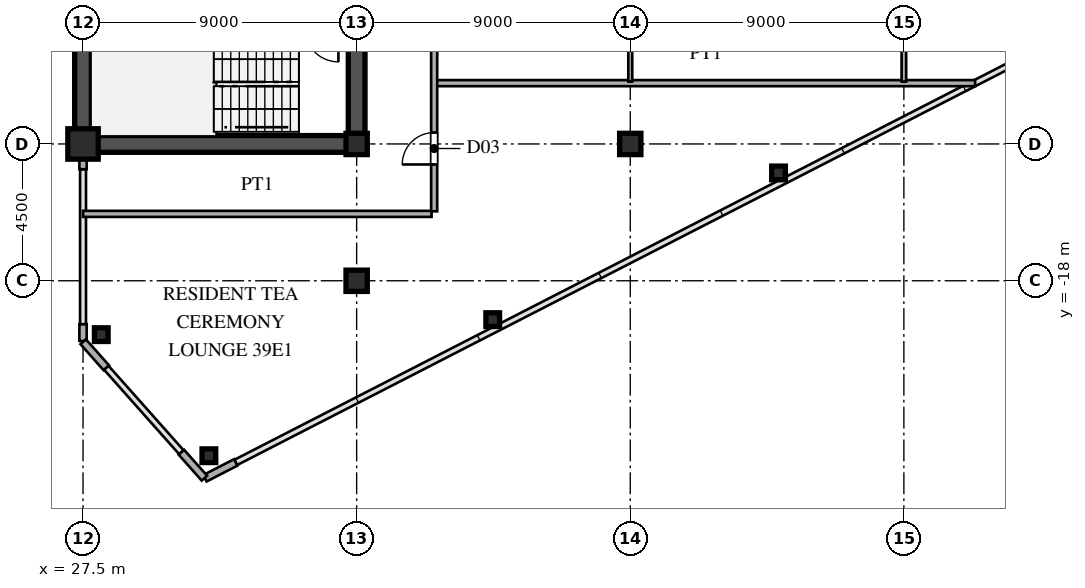
"""IFC4 building model, lengths in metres.
Left out: names, types, materials, properties, quantities, classifications, styles, units other than length and angle.
Written with IfcOpenShell. Run it as: python <this file> out.ifc"""

import sys

from ifc_helpers import new_model, si_unit, direction, frame, frame_2d, origin, origin_2d, place, context, subcontext, project, spatial, rectangle, hollow_rectangle, i_section, extrude, source, transform, mapped, element, fill, save


model = new_model("IFC4")
c1 = context("Model", 3, precision=1e-05, world=origin(), true_north=direction((0.0, 1.0)))
c2 = subcontext(c1, "Body", "Model", "MODEL_VIEW")
j1 = project(units=[si_unit("LENGTHUNIT", "METRE"), si_unit("PLANEANGLEUNIT", "RADIAN")], contexts=[c1])
p1 = place(None, origin())
s1 = spatial("IfcSite", under=j1, at=p1, CompositionType="ELEMENT")
p2 = place(p1, origin())
s2 = spatial("IfcBuilding", under=s1, at=p2, CompositionType="ELEMENT")
p3 = place(p2, frame((0.0, 0.0, 147.6)))
s3 = spatial("IfcBuildingStorey", under=s2, at=p3, CompositionType="ELEMENT", Elevation=147.6)
m1 = source(origin(), c2, "Body", "SweptSolid", [
    extrude(hollow_rectangle(XDim=1.0, YDim=1.0, WallThickness=0.042, at=origin_2d()), origin(), (0.0, 0.0, 1.0), 3.6),
])
p4 = place(p3, frame((27.5, -13.5, 0.0), z_axis=(0.0, 0.0, 1.0), x_axis=(1.0, 0.0, 0.0)))
e1 = element("IfcColumn", 1, at=p4, inside=s3, PredefinedType="COLUMN", context=c2, shape_type="MappedRepresentation", body=[
    mapped(m1, transform((0.0, 0.0, 0.0), scale=1.0)),
])
m2 = source(origin(), c2, "Body", "SweptSolid", [
    extrude(i_section(OverallWidth=0.7, OverallDepth=0.7, WebThickness=0.028, FlangeThickness=0.045, at=origin_2d()), origin(), (0.0, 0.0, 1.0), 3.6),
])
for number, where, z_axis, x_axis in (
    (2, (36.5, -18.0, 0.0), (0.0, 0.0, 1.0), (1.0, 0.0, 0.0)),
    (3, (36.5, -13.5, 0.0), (0.0, 0.0, 1.0), (1.0, 0.0, 0.0)),
    (4, (45.5, -13.5, 0.0), (0.0, 0.0, 1.0), (1.0, 0.0, 0.0)),
):
    element("IfcColumn", number, at=place(p3, frame(where, z_axis=z_axis, x_axis=x_axis)), inside=s3, PredefinedType="COLUMN", context=c2, shape_type="MappedRepresentation", body=[
        mapped(m2, transform((0.0, 0.0, 0.0), scale=1.0)),
    ])
m3 = source(origin(), c2, "Body", "SweptSolid", [
    extrude(hollow_rectangle(XDim=0.45, YDim=0.45, WallThickness=0.018, at=origin_2d()), origin(), (0.0, 0.0, 1.0), 3.6),
])
for number, where, z_axis, x_axis in (
    (5, (31.64, -23.754, 0.0), (0.0, 0.0, 1.0), (1.0, 0.0, 0.0)),
    (6, (28.1, -19.772, 0.0), (0.0, 0.0, 1.0), (1.0, 0.0, 0.0)),
    (7, (40.976, -19.278, 0.0), (0.0, 0.0, 1.0), (1.0, 0.0, 0.0)),
    (8, (50.377, -14.453, 0.0), (0.0, 0.0, 1.0), (1.0, 0.0, 0.0)),
):
    element("IfcColumn", number, at=place(p3, frame(where, z_axis=z_axis, x_axis=x_axis)), inside=s3, PredefinedType="COLUMN", context=c2, shape_type="MappedRepresentation", body=[
        mapped(m3, transform((0.0, 0.0, 0.0), scale=1.0)),
    ])
p5 = place(p3, frame((31.509, -24.495, 0.0), z_axis=(0.0, 0.0, 1.0), x_axis=(0.889797395748, 0.456355776255, 0.0)))
e9 = element("IfcWall", 9, at=p5, inside=s3, PredefinedType="SOLIDWALL", context=c2, shape_type="SweptSolid", body=[
    extrude(rectangle(XDim=1.14, YDim=0.24, at=frame_2d((0.57, 0.0))), origin(), (0.0, 0.0, 1.0), 3.38),
])
p6 = place(p3, frame((27.5, -19.98, 0.0), z_axis=(0.0, 0.0, 1.0), x_axis=(0.0, 1.0, 0.0)))
e10 = element("IfcWall", 10, at=p6, inside=s3, PredefinedType="SOLIDWALL", context=c2, shape_type="SweptSolid", body=[
    extrude(rectangle(XDim=0.55, YDim=0.24, at=frame_2d((0.275, 0.0))), origin(), (0.0, 0.0, 1.0), 3.38),
])
p7 = place(p3, frame((27.5, -14.33, 0.0), z_axis=(0.0, 0.0, 1.0), x_axis=(0.0, 1.0, 0.0)))
e11 = element("IfcWall", 11, at=p7, inside=s3, PredefinedType="SOLIDWALL", context=c2, shape_type="SweptSolid", body=[
    extrude(rectangle(XDim=0.55, YDim=0.24, at=frame_2d((0.275, 0.0))), origin(), (0.0, 0.0, 1.0), 2.88),
])
for number, where, z_axis, x_axis in (
    (12, (27.507, -20.008, 0.0), (0.0, 0.0, 1.0), (0.664, -0.747, 0.0)),
    (13, (30.736, -23.64, 0.0), (0.0, 0.0, 1.0), (0.664, -0.747, 0.0)),
):
    element("IfcWall", number, at=place(p3, frame(where, z_axis=z_axis, x_axis=x_axis)), inside=s3, PredefinedType="SOLIDWALL", context=c2, shape_type="SweptSolid", body=[
        extrude(rectangle(XDim=1.14, YDim=0.24, at=frame_2d((0.57, 0.0))), origin(), (0.0, 0.0, 1.0), 3.38),
    ])
p8 = place(p3, frame((27.5, -13.5, 0.0), z_axis=(0.0, 0.0, 1.0), x_axis=(0.0, 1.0, 0.0)))
e14 = element("IfcWall", 14, at=p8, inside=s3, PredefinedType="SHEAR", context=c2, shape_type="SweptSolid", body=[
    extrude(rectangle(XDim=12.2, YDim=0.55, at=frame_2d((6.1, 0.0))), origin(), (0.0, 0.0, 1.0), 3.38),
])
p9 = place(p3, frame((27.5, -13.5, 0.0), z_axis=(0.0, 0.0, 1.0), x_axis=(1.0, 0.0, 0.0)))
e15 = element("IfcWall", 15, at=p9, inside=s3, PredefinedType="SHEAR", context=c2, shape_type="SweptSolid", body=[
    extrude(rectangle(XDim=9.0, YDim=0.55, at=frame_2d((4.5, 0.0))), origin(), (0.0, 0.0, 1.0), 3.38),
])
p10 = place(p3, frame((36.5, -13.65, 0.0), z_axis=(0.0, 0.0, 1.0), x_axis=(0.0, 1.0, 0.0)))
e16 = element("IfcWall", 16, at=p10, inside=s3, PredefinedType="SHEAR", context=c2, shape_type="SweptSolid", body=[
    extrude(rectangle(XDim=7.15, YDim=0.55, at=frame_2d((3.575, 0.0))), origin(), (0.0, 0.0, 1.0), 3.38),
])
p11 = place(p10, frame((4.675, 0.0, 0.0)))
e17 = element("IfcOpeningElement", 17, at=p11, cuts=e16, PredefinedType="OPENING", context=c2, shape_type="SweptSolid", body=[
    extrude(rectangle(XDim=1.15, YDim=2.2, at=frame_2d((0.575, 1.1))), frame((0.0, 0.285, 0.0), z_axis=(0.0, -1.0, 0.0), x_axis=(1.0, 0.0, 0.0)), (0.0, 0.0, 1.0), 0.57),
])
p12 = place(p3, frame((27.5, -15.8, 0.0), z_axis=(0.0, 0.0, 1.0), x_axis=(1.0, 0.0, 0.0)))
e18 = element("IfcWall", 18, at=p12, inside=s3, PredefinedType="PARTITIONING", context=c2, shape_type="SweptSolid", body=[
    extrude(rectangle(XDim=11.465, YDim=0.2, at=frame_2d((5.732, 0.0))), origin(), (0.0, 0.0, 1.0), 3.38),
])
p13 = place(p3, frame((39.13, -11.5, 0.0), z_axis=(0.0, 0.0, 1.0), x_axis=(1.0, 0.0, 0.0)))
e19 = element("IfcWall", 19, at=p13, inside=s3, PredefinedType="PARTITIONING", context=c2, shape_type="SweptSolid", body=[
    extrude(rectangle(XDim=17.714, YDim=0.2, at=frame_2d((8.857, 0.0))), origin(), (0.0, 0.0, 1.0), 3.38),
])
p14 = place(p3, frame((39.05, -15.715, 0.0), z_axis=(0.0, 0.0, 1.0), x_axis=(0.0, 1.0, 0.0)))
e20 = element("IfcWall", 20, at=p14, inside=s3, PredefinedType="PARTITIONING", context=c2, shape_type="SweptSolid", body=[
    extrude(rectangle(XDim=31.43, YDim=0.2, at=frame_2d((15.715, 0.0))), origin(), (0.0, 0.0, 1.0), 3.38),
])
p15 = place(p14, frame((1.54, 0.0, 0.0)))
e21 = element("IfcOpeningElement", 21, at=p15, cuts=e20, PredefinedType="OPENING", context=c2, shape_type="SweptSolid", body=[
    extrude(rectangle(XDim=1.05, YDim=2.25, at=frame_2d((0.525, 1.125))), frame((0.0, 0.11, 0.0), z_axis=(0.0, -1.0, 0.0), x_axis=(1.0, 0.0, 0.0)), (0.0, 0.0, 1.0), 0.22),
])
p16 = place(p14, frame((8.782, 0.0, 0.0)))
e22 = element("IfcOpeningElement", 22, at=p16, cuts=e20, PredefinedType="OPENING", context=c2, shape_type="SweptSolid", body=[
    extrude(rectangle(XDim=1.05, YDim=2.25, at=frame_2d((0.525, 1.125))), frame((0.0, 0.11, 0.0), z_axis=(0.0, -1.0, 0.0), x_axis=(1.0, 0.0, 0.0)), (0.0, 0.0, 1.0), 0.22),
])
p17 = place(p14, frame((19.282, 0.0, 0.0)))
e23 = element("IfcOpeningElement", 23, at=p17, cuts=e20, PredefinedType="OPENING", context=c2, shape_type="SweptSolid", body=[
    extrude(rectangle(XDim=1.05, YDim=2.25, at=frame_2d((0.525, 1.125))), frame((0.0, 0.11, 0.0), z_axis=(0.0, -1.0, 0.0), x_axis=(1.0, 0.0, 0.0)), (0.0, 0.0, 1.0), 0.22),
])
p18 = place(p14, frame((27.84, 0.0, 0.0)))
e24 = element("IfcOpeningElement", 24, at=p18, cuts=e20, PredefinedType="OPENING", context=c2, shape_type="SweptSolid", body=[
    extrude(rectangle(XDim=1.05, YDim=2.25, at=frame_2d((0.525, 1.125))), frame((0.0, 0.11, 0.0), z_axis=(0.0, -1.0, 0.0), x_axis=(1.0, 0.0, 0.0)), (0.0, 0.0, 1.0), 0.22),
])
p19 = place(p3, frame((45.5, -11.45, 0.0), z_axis=(0.0, 0.0, 1.0), x_axis=(0.0, 1.0, 0.0)))
e25 = element("IfcWall", 25, at=p19, inside=s3, PredefinedType="PARTITIONING", context=c2, shape_type="SweptSolid", body=[
    extrude(rectangle(XDim=2.733, YDim=0.13, at=frame_2d((1.366, 0.0))), origin(), (0.0, 0.0, 1.0), 2.78),
])
p20 = place(p3, frame((54.5, -11.45, 0.0), z_axis=(0.0, 0.0, 1.0), x_axis=(0.0, 1.0, 0.0)))
e26 = element("IfcWall", 26, at=p20, inside=s3, PredefinedType="PARTITIONING", context=c2, shape_type="SweptSolid", body=[
    extrude(rectangle(XDim=20.9, YDim=0.15, at=frame_2d((10.45, 0.0))), origin(), (0.0, 0.0, 1.0), 2.78),
])
p21 = place(p20, frame((4.725, 0.0, 0.0)))
e27 = element("IfcOpeningElement", 27, at=p21, cuts=e26, PredefinedType="OPENING", context=c2, shape_type="SweptSolid", body=[
    extrude(rectangle(XDim=0.95, YDim=2.15, at=frame_2d((0.475, 1.075))), frame((0.0, 0.085, 0.0), z_axis=(0.0, -1.0, 0.0), x_axis=(1.0, 0.0, 0.0)), (0.0, 0.0, 1.0), 0.17),
])
p22 = place(p20, frame((1.225, 0.0, 0.0)))
e28 = element("IfcOpeningElement", 28, at=p22, cuts=e26, PredefinedType="OPENING", context=c2, shape_type="SweptSolid", body=[
    extrude(rectangle(XDim=0.95, YDim=2.15, at=frame_2d((0.475, 1.075))), frame((0.0, 0.085, 0.0), z_axis=(0.0, -1.0, 0.0), x_axis=(1.0, 0.0, 0.0)), (0.0, 0.0, 1.0), 0.17),
])
p23 = place(p20, frame((8.225, 0.0, 0.0)))
e29 = element("IfcOpeningElement", 29, at=p23, cuts=e26, PredefinedType="OPENING", context=c2, shape_type="SweptSolid", body=[
    extrude(rectangle(XDim=0.95, YDim=2.15, at=frame_2d((0.475, 1.075))), frame((0.0, 0.085, 0.0), z_axis=(0.0, -1.0, 0.0), x_axis=(1.0, 0.0, 0.0)), (0.0, 0.0, 1.0), 0.17),
])
p24 = place(p20, frame((14.552, 0.0, 0.0)))
e30 = element("IfcOpeningElement", 30, at=p24, cuts=e26, PredefinedType="OPENING", context=c2, shape_type="SweptSolid", body=[
    extrude(rectangle(XDim=0.95, YDim=2.15, at=frame_2d((0.475, 1.075))), frame((0.0, 0.085, 0.0), z_axis=(0.0, -1.0, 0.0), x_axis=(1.0, 0.0, 0.0)), (0.0, 0.0, 1.0), 0.17),
])
m4 = source(origin(), c2, "Body", "SweptSolid", [
    extrude(rectangle(XDim=1.05, YDim=2.25, at=frame_2d((0.525, 1.125))), frame((0.0, 0.025, 0.0), z_axis=(0.0, -1.0, 0.0), x_axis=(1.0, 0.0, 0.0)), (0.0, 0.0, 1.0), 0.05),
])
p25 = place(p15, origin())
e31 = element("IfcDoor", 31, at=p25, inside=s3, OperationType="SINGLE_SWING_LEFT", PredefinedType="DOOR", context=c2, shape_type="MappedRepresentation", body=[
    mapped(m4, transform((0.0, 0.0, 0.0), scale=1.0)),
])
fill(e21, e31)
save(model, sys.argv[1])
